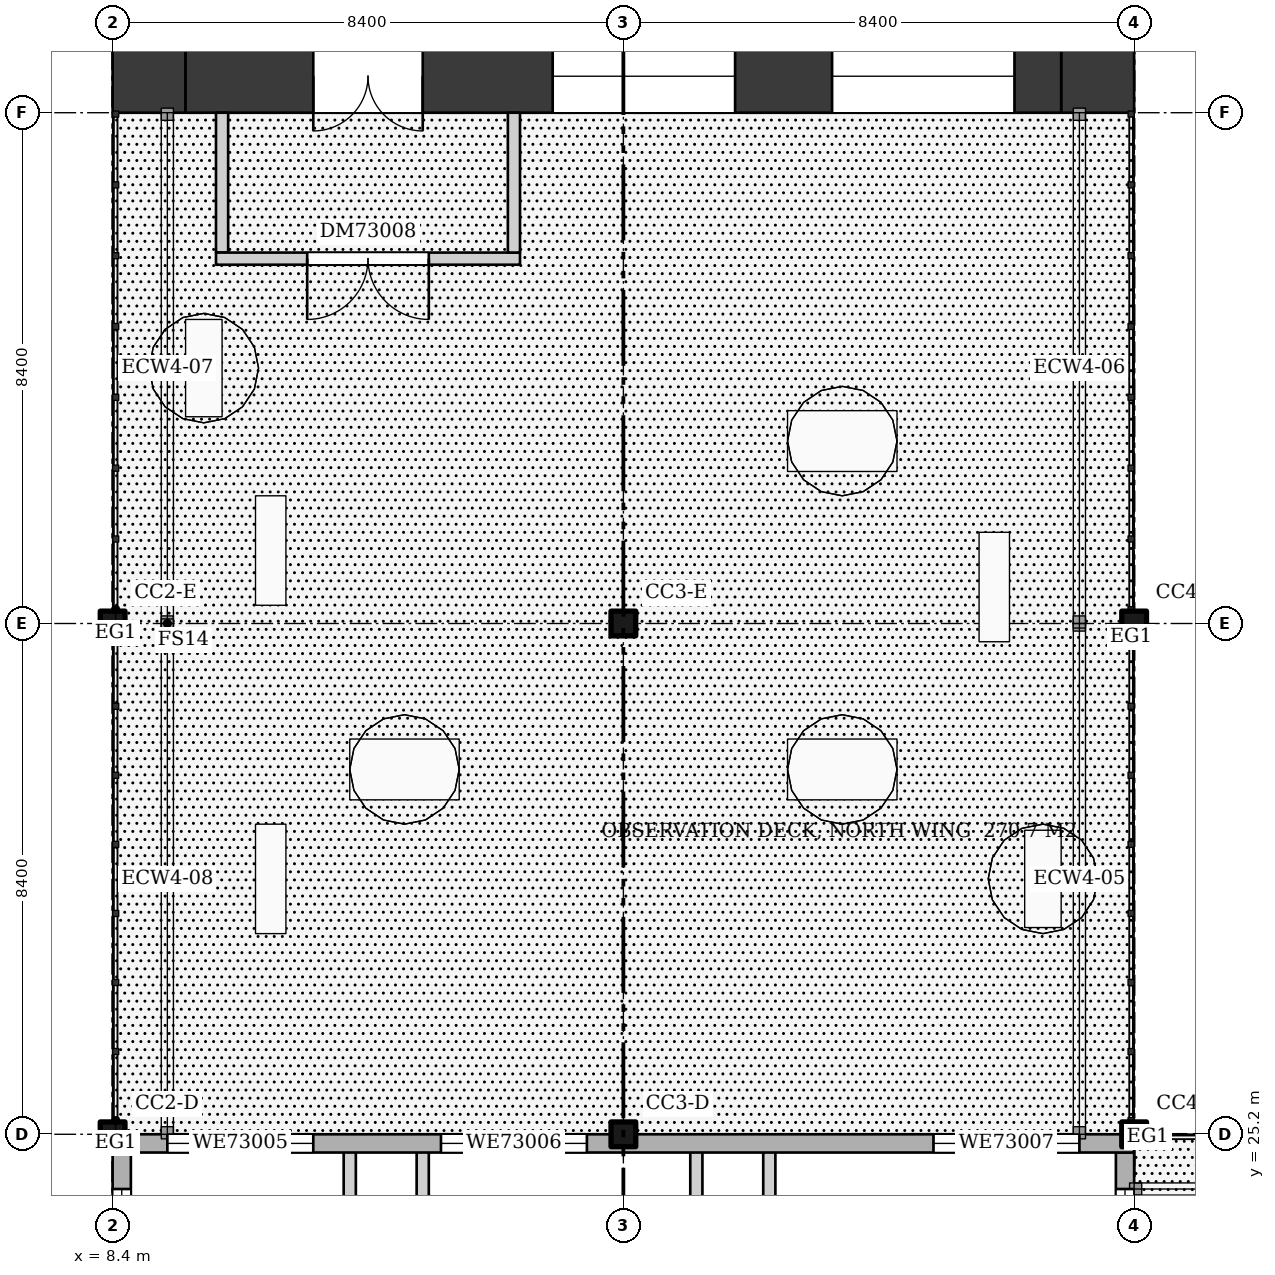
"""IFC4 building model, lengths in metres.
Left out: names, types, materials, properties, quantities, classifications, styles, units other than length and angle.
Written with IfcOpenShell. Run it as: python <this file> out.ifc"""

import sys

from ifc_helpers import new_model, si_unit, direction, frame, frame_2d, origin, origin_2d, place, context, subcontext, project, spatial, rectangle, hollow_circle, extrude, element, fill, save


model = new_model("IFC4")
c1 = context("Model", 3, precision=1e-05, world=origin(), true_north=direction((0.0, 1.0)))
c2 = subcontext(c1, "Body", "Model", "MODEL_VIEW")
j1 = project(units=[si_unit("LENGTHUNIT", "METRE"), si_unit("PLANEANGLEUNIT", "RADIAN")], contexts=[c1])
p1 = place(None, origin())
s1 = spatial("IfcSite", under=j1, at=p1, CompositionType="ELEMENT")
p2 = place(p1, origin())
s2 = spatial("IfcBuilding", under=s1, at=p2, CompositionType="ELEMENT")
p3 = place(p2, frame((0.0, 0.0, 277.2)))
s3 = spatial("IfcBuildingStorey", under=s2, at=p3, CompositionType="ELEMENT", Elevation=277.2)
for number, where, z_axis, x_axis in (
    (1, (8.4, 25.2, 0.0), (0.0, 0.0, 1.0), (1.0, 0.0, 0.0)),
    (2, (8.4, 33.6, 0.0), (0.0, 0.0, 1.0), (1.0, 0.0, 0.0)),
    (3, (16.8, 25.2, 0.0), (0.0, 0.0, 1.0), (1.0, 0.0, 0.0)),
    (4, (16.8, 33.6, 0.0), (0.0, 0.0, 1.0), (1.0, 0.0, 0.0)),
    (5, (25.2, 25.2, 0.0), (0.0, 0.0, 1.0), (1.0, 0.0, 0.0)),
    (6, (25.2, 33.6, 0.0), (0.0, 0.0, 1.0), (1.0, 0.0, 0.0)),
):
    element("IfcColumn", number, at=place(p3, frame(where, z_axis=z_axis, x_axis=x_axis)), inside=s3, PredefinedType="COLUMN", context=c2, shape_type="SweptSolid", body=[
        extrude(hollow_circle(Radius=0.203, WallThickness=0.016, at=origin_2d()), origin(), (0.0, 0.0, 1.0), 6.65),
    ])
p4 = place(p3, frame((9.0, 58.8, 0.0), z_axis=(0.0, 0.0, 1.0), x_axis=(0.0, -1.0, 0.0)))
e7 = element("IfcWall", 7, at=p4, inside=s3, PredefinedType="SHEAR", context=c2, shape_type="SweptSolid", body=[
    extrude(rectangle(XDim=16.8, YDim=1.2, at=frame_2d((8.4, 0.0))), origin(), (0.0, 0.0, 1.0), 6.58),
])
p5 = place(p4, frame((1.6, 0.0, 0.6)))
e8 = element("IfcOpeningElement", 8, at=p5, cuts=e7, PredefinedType="OPENING", context=c2, shape_type="SweptSolid", body=[
    extrude(rectangle(XDim=2.4, YDim=2.1, at=frame_2d((1.2, 1.05))), frame((0.0, 0.61, 0.0), z_axis=(0.0, -1.0, 0.0), x_axis=(1.0, 0.0, 0.0)), (0.0, 0.0, 1.0), 1.22),
])
p6 = place(p4, frame((4.938, 0.0, 1.6)))
e9 = element("IfcOpeningElement", 9, at=p6, cuts=e7, PredefinedType="OPENING", context=c2, shape_type="SweptSolid", body=[
    extrude(rectangle(XDim=3.0, YDim=1.2, at=frame_2d((1.5, 0.6))), frame((0.0, 0.61, 0.0), z_axis=(0.0, -1.0, 0.0), x_axis=(1.0, 0.0, 0.0)), (0.0, 0.0, 1.0), 1.22),
])
p7 = place(p4, frame((8.863, 0.0, 1.6)))
e10 = element("IfcOpeningElement", 10, at=p7, cuts=e7, PredefinedType="OPENING", context=c2, shape_type="SweptSolid", body=[
    extrude(rectangle(XDim=3.0, YDim=1.2, at=frame_2d((1.5, 0.6))), frame((0.0, 0.61, 0.0), z_axis=(0.0, -1.0, 0.0), x_axis=(1.0, 0.0, 0.0)), (0.0, 0.0, 1.0), 1.22),
])
p8 = place(p4, frame((12.8, 0.0, 0.6)))
e11 = element("IfcOpeningElement", 11, at=p8, cuts=e7, PredefinedType="OPENING", context=c2, shape_type="SweptSolid", body=[
    extrude(rectangle(XDim=2.4, YDim=2.1, at=frame_2d((1.2, 1.05))), frame((0.0, 0.61, 0.0), z_axis=(0.0, -1.0, 0.0), x_axis=(1.0, 0.0, 0.0)), (0.0, 0.0, 1.0), 1.22),
])
p9 = place(p3, frame((24.6, 58.8, 0.0), z_axis=(0.0, 0.0, 1.0), x_axis=(0.0, -1.0, 0.0)))
e12 = element("IfcWall", 12, at=p9, inside=s3, PredefinedType="SHEAR", context=c2, shape_type="SweptSolid", body=[
    extrude(rectangle(XDim=16.8, YDim=1.2, at=frame_2d((8.4, 0.0))), origin(), (0.0, 0.0, 1.0), 6.58),
])
p10 = place(p9, frame((1.8, 0.0, 0.5)))
e13 = element("IfcOpeningElement", 13, at=p10, cuts=e12, PredefinedType="OPENING", context=c2, shape_type="SweptSolid", body=[
    extrude(rectangle(XDim=1.8, YDim=2.4, at=frame_2d((0.9, 1.2))), frame((0.0, 0.61, 0.0), z_axis=(0.0, -1.0, 0.0), x_axis=(1.0, 0.0, 0.0)), (0.0, 0.0, 1.0), 1.22),
])
p11 = place(p9, frame((4.644, 0.0, 1.6)))
e14 = element("IfcOpeningElement", 14, at=p11, cuts=e12, PredefinedType="OPENING", context=c2, shape_type="SweptSolid", body=[
    extrude(rectangle(XDim=1.2, YDim=1.2, at=frame_2d((0.6, 0.6))), frame((0.0, 0.61, 0.0), z_axis=(0.0, -1.0, 0.0), x_axis=(1.0, 0.0, 0.0)), (0.0, 0.0, 1.0), 1.22),
])
p12 = place(p9, frame((6.45, 0.0, 1.6)))
e15 = element("IfcOpeningElement", 15, at=p12, cuts=e12, PredefinedType="OPENING", context=c2, shape_type="SweptSolid", body=[
    extrude(rectangle(XDim=1.8, YDim=1.2, at=frame_2d((0.9, 0.6))), frame((0.0, 0.61, 0.0), z_axis=(0.0, -1.0, 0.0), x_axis=(1.0, 0.0, 0.0)), (0.0, 0.0, 1.0), 1.22),
])
p13 = place(p9, frame((12.65, 0.0, 0.6)))
e16 = element("IfcOpeningElement", 16, at=p13, cuts=e12, PredefinedType="OPENING", context=c2, shape_type="SweptSolid", body=[
    extrude(rectangle(XDim=1.0, YDim=2.1, at=frame_2d((0.5, 1.05))), frame((0.0, 0.61, 0.0), z_axis=(0.0, -1.0, 0.0), x_axis=(1.0, 0.0, 0.0)), (0.0, 0.0, 1.0), 1.22),
])
p14 = place(p9, frame((14.175, 0.0, 1.6)))
e17 = element("IfcOpeningElement", 17, at=p14, cuts=e12, PredefinedType="OPENING", context=c2, shape_type="SweptSolid", body=[
    extrude(rectangle(XDim=1.2, YDim=1.2, at=frame_2d((0.6, 0.6))), frame((0.0, 0.61, 0.0), z_axis=(0.0, -1.0, 0.0), x_axis=(1.0, 0.0, 0.0)), (0.0, 0.0, 1.0), 1.22),
])
p15 = place(p3, frame((9.6, 42.6, 0.0), z_axis=(0.0, 0.0, 1.0), x_axis=(1.0, 0.0, 0.0)))
e18 = element("IfcWall", 18, at=p15, inside=s3, PredefinedType="SHEAR", context=c2, shape_type="SweptSolid", body=[
    extrude(rectangle(XDim=14.4, YDim=1.2, at=frame_2d((7.2, 0.0))), origin(), (0.0, 0.0, 1.0), 6.58),
])
p16 = place(p15, frame((2.1, 0.0, 0.0)))
e19 = element("IfcOpeningElement", 19, at=p16, cuts=e18, PredefinedType="OPENING", context=c2, shape_type="SweptSolid", body=[
    extrude(rectangle(XDim=1.8, YDim=2.1, at=frame_2d((0.9, 1.05))), frame((0.0, 0.61, 0.0), z_axis=(0.0, -1.0, 0.0), x_axis=(1.0, 0.0, 0.0)), (0.0, 0.0, 1.0), 1.22),
])
p17 = place(p15, frame((6.038, 0.0, 1.6)))
e20 = element("IfcOpeningElement", 20, at=p17, cuts=e18, PredefinedType="OPENING", context=c2, shape_type="SweptSolid", body=[
    extrude(rectangle(XDim=3.0, YDim=1.2, at=frame_2d((1.5, 0.6))), frame((0.0, 0.61, 0.0), z_axis=(0.0, -1.0, 0.0), x_axis=(1.0, 0.0, 0.0)), (0.0, 0.0, 1.0), 1.22),
])
p18 = place(p15, frame((10.633, 0.0, 1.6)))
e21 = element("IfcOpeningElement", 21, at=p18, cuts=e18, PredefinedType="OPENING", context=c2, shape_type="SweptSolid", body=[
    extrude(rectangle(XDim=3.0, YDim=1.2, at=frame_2d((1.5, 0.6))), frame((0.0, 0.61, 0.0), z_axis=(0.0, -1.0, 0.0), x_axis=(1.0, 0.0, 0.0)), (0.0, 0.0, 1.0), 1.22),
])
p19 = place(p3, frame((10.2, 39.7, 0.0), z_axis=(0.0, 0.0, 1.0), x_axis=(0.0, 1.0, 0.0)))
e22 = element("IfcWall", 22, at=p19, inside=s3, PredefinedType="PARTITIONING", context=c2, shape_type="SweptSolid", body=[
    extrude(rectangle(XDim=2.3, YDim=0.2, at=frame_2d((1.15, 0.0))), origin(), (0.0, 0.0, 1.0), 6.65),
])
p20 = place(p3, frame((10.1, 39.6, 0.0), z_axis=(0.0, 0.0, 1.0), x_axis=(1.0, 0.0, 0.0)))
e23 = element("IfcWall", 23, at=p20, inside=s3, PredefinedType="PARTITIONING", context=c2, shape_type="SweptSolid", body=[
    extrude(rectangle(XDim=5.0, YDim=0.2, at=frame_2d((2.5, 0.0))), origin(), (0.0, 0.0, 1.0), 6.65),
])
p21 = place(p20, frame((1.5, 0.0, 0.0)))
e24 = element("IfcOpeningElement", 24, at=p21, cuts=e23, PredefinedType="OPENING", context=c2, shape_type="SweptSolid", body=[
    extrude(rectangle(XDim=2.0, YDim=2.1, at=frame_2d((1.0, 1.05))), frame((0.0, 0.11, 0.0), z_axis=(0.0, -1.0, 0.0), x_axis=(1.0, 0.0, 0.0)), (0.0, 0.0, 1.0), 0.22),
])
p22 = place(p3, frame((12.3, 21.1, 0.0), z_axis=(0.0, 0.0, 1.0), x_axis=(0.0, 1.0, 0.0)))
e25 = element("IfcWall", 25, at=p22, inside=s3, PredefinedType="PARTITIONING", context=c2, shape_type="SweptSolid", body=[
    extrude(rectangle(XDim=3.95, YDim=0.2, at=frame_2d((1.975, 0.0))), origin(), (0.0, 0.0, 1.0), 6.65),
])
p23 = place(p22, frame((1.475, 0.0, 0.0)))
e26 = element("IfcOpeningElement", 26, at=p23, cuts=e25, PredefinedType="OPENING", context=c2, shape_type="SweptSolid", body=[
    extrude(rectangle(XDim=1.0, YDim=2.1, at=frame_2d((0.5, 1.05))), frame((0.0, 0.11, 0.0), z_axis=(0.0, -1.0, 0.0), x_axis=(1.0, 0.0, 0.0)), (0.0, 0.0, 1.0), 0.22),
])
p24 = place(p3, frame((13.5, 20.8, 0.0), z_axis=(0.0, 0.0, 1.0), x_axis=(0.0, 1.0, 0.0)))
e27 = element("IfcWall", 27, at=p24, inside=s3, PredefinedType="PARTITIONING", context=c2, shape_type="SweptSolid", body=[
    extrude(rectangle(XDim=4.25, YDim=0.2, at=frame_2d((2.125, 0.0))), origin(), (0.0, 0.0, 1.0), 6.65),
])
p25 = place(p3, frame((15.0, 39.7, 0.0), z_axis=(0.0, 0.0, 1.0), x_axis=(0.0, 1.0, 0.0)))
e28 = element("IfcWall", 28, at=p25, inside=s3, PredefinedType="PARTITIONING", context=c2, shape_type="SweptSolid", body=[
    extrude(rectangle(XDim=2.3, YDim=0.2, at=frame_2d((1.15, 0.0))), origin(), (0.0, 0.0, 1.0), 6.65),
])
p26 = place(p3, frame((18.0, 17.0, 0.0), z_axis=(0.0, 0.0, 1.0), x_axis=(0.0, 1.0, 0.0)))
e29 = element("IfcWall", 29, at=p26, inside=s3, PredefinedType="PARTITIONING", context=c2, shape_type="SweptSolid", body=[
    extrude(rectangle(XDim=8.05, YDim=0.2, at=frame_2d((4.025, 0.0))), origin(), (0.0, 0.0, 1.0), 6.65),
])
p27 = place(p26, frame((3.525, 0.0, 0.0)))
e30 = element("IfcOpeningElement", 30, at=p27, cuts=e29, PredefinedType="OPENING", context=c2, shape_type="SweptSolid", body=[
    extrude(rectangle(XDim=1.0, YDim=2.1, at=frame_2d((0.5, 1.05))), frame((0.0, 0.11, 0.0), z_axis=(0.0, -1.0, 0.0), x_axis=(1.0, 0.0, 0.0)), (0.0, 0.0, 1.0), 0.22),
])
p28 = place(p3, frame((19.2, 21.1, 0.0), z_axis=(0.0, 0.0, 1.0), x_axis=(0.0, 1.0, 0.0)))
e31 = element("IfcWall", 31, at=p28, inside=s3, PredefinedType="PARTITIONING", context=c2, shape_type="SweptSolid", body=[
    extrude(rectangle(XDim=3.95, YDim=0.2, at=frame_2d((1.975, 0.0))), origin(), (0.0, 0.0, 1.0), 6.65),
])
p29 = place(p28, frame((1.475, 0.0, 0.0)))
e32 = element("IfcOpeningElement", 32, at=p29, cuts=e31, PredefinedType="OPENING", context=c2, shape_type="SweptSolid", body=[
    extrude(rectangle(XDim=1.0, YDim=2.1, at=frame_2d((0.5, 1.05))), frame((0.0, 0.11, 0.0), z_axis=(0.0, -1.0, 0.0), x_axis=(1.0, 0.0, 0.0)), (0.0, 0.0, 1.0), 0.22),
])
p30 = place(p3, frame((25.05, 8.7, 0.0), z_axis=(0.0, 0.0, 1.0), x_axis=(0.0, 1.0, 0.0)))
e33 = element("IfcWall", 33, at=p30, inside=s3, PredefinedType="SOLIDWALL", context=c2, shape_type="SweptSolid", body=[
    extrude(rectangle(XDim=16.2, YDim=0.3, at=frame_2d((8.1, 0.0))), origin(), (0.0, 0.0, 1.0), 6.3),
])
p31 = place(p30, frame((0.6, 0.0, 0.6)))
e34 = element("IfcOpeningElement", 34, at=p31, cuts=e33, PredefinedType="OPENING", context=c2, shape_type="SweptSolid", body=[
    extrude(rectangle(XDim=2.4, YDim=2.4, at=frame_2d((1.2, 1.2))), frame((0.0, 0.16, 0.0), z_axis=(0.0, -1.0, 0.0), x_axis=(1.0, 0.0, 0.0)), (0.0, 0.0, 1.0), 0.32),
])
p32 = place(p30, frame((4.8, 0.0, 0.6)))
e35 = element("IfcOpeningElement", 35, at=p32, cuts=e33, PredefinedType="OPENING", context=c2, shape_type="SweptSolid", body=[
    extrude(rectangle(XDim=2.4, YDim=2.4, at=frame_2d((1.2, 1.2))), frame((0.0, 0.16, 0.0), z_axis=(0.0, -1.0, 0.0), x_axis=(1.0, 0.0, 0.0)), (0.0, 0.0, 1.0), 0.32),
])
p33 = place(p30, frame((9.0, 0.0, 0.6)))
e36 = element("IfcOpeningElement", 36, at=p33, cuts=e33, PredefinedType="OPENING", context=c2, shape_type="SweptSolid", body=[
    extrude(rectangle(XDim=2.4, YDim=2.4, at=frame_2d((1.2, 1.2))), frame((0.0, 0.16, 0.0), z_axis=(0.0, -1.0, 0.0), x_axis=(1.0, 0.0, 0.0)), (0.0, 0.0, 1.0), 0.32),
])
p34 = place(p30, frame((13.2, 0.0, 0.6)))
e37 = element("IfcOpeningElement", 37, at=p34, cuts=e33, PredefinedType="OPENING", context=c2, shape_type="SweptSolid", body=[
    extrude(rectangle(XDim=2.4, YDim=2.4, at=frame_2d((1.2, 1.2))), frame((0.0, 0.16, 0.0), z_axis=(0.0, -1.0, 0.0), x_axis=(1.0, 0.0, 0.0)), (0.0, 0.0, 1.0), 0.32),
])
p35 = place(p3, frame((25.2, 25.05, 0.0), z_axis=(0.0, 0.0, 1.0), x_axis=(-1.0, 0.0, 0.0)))
e38 = element("IfcWall", 38, at=p35, inside=s3, PredefinedType="SOLIDWALL", context=c2, shape_type="SweptSolid", body=[
    extrude(rectangle(XDim=16.8, YDim=0.3, at=frame_2d((8.4, 0.0))), origin(), (0.0, 0.0, 1.0), 6.3),
])
p36 = place(p35, frame((13.5, 0.0, 0.6)))
e39 = element("IfcOpeningElement", 39, at=p36, cuts=e38, PredefinedType="OPENING", context=c2, shape_type="SweptSolid", body=[
    extrude(rectangle(XDim=2.4, YDim=2.4, at=frame_2d((1.2, 1.2))), frame((0.0, 0.16, 0.0), z_axis=(0.0, -1.0, 0.0), x_axis=(1.0, 0.0, 0.0)), (0.0, 0.0, 1.0), 0.32),
])
p37 = place(p35, frame((9.0, 0.0, 0.6)))
e40 = element("IfcOpeningElement", 40, at=p37, cuts=e38, PredefinedType="OPENING", context=c2, shape_type="SweptSolid", body=[
    extrude(rectangle(XDim=2.4, YDim=2.4, at=frame_2d((1.2, 1.2))), frame((0.0, 0.16, 0.0), z_axis=(0.0, -1.0, 0.0), x_axis=(1.0, 0.0, 0.0)), (0.0, 0.0, 1.0), 0.32),
])
p38 = place(p35, frame((0.9, 0.0, 0.6)))
e41 = element("IfcOpeningElement", 41, at=p38, cuts=e38, PredefinedType="OPENING", context=c2, shape_type="SweptSolid", body=[
    extrude(rectangle(XDim=2.4, YDim=2.4, at=frame_2d((1.2, 1.2))), frame((0.0, 0.16, 0.0), z_axis=(0.0, -1.0, 0.0), x_axis=(1.0, 0.0, 0.0)), (0.0, 0.0, 1.0), 0.32),
])
p39 = place(p3, frame((8.55, 24.9, 0.0), z_axis=(0.0, 0.0, 1.0), x_axis=(0.0, -1.0, 0.0)))
e42 = element("IfcWall", 42, at=p39, inside=s3, PredefinedType="SOLIDWALL", context=c2, shape_type="SweptSolid", body=[
    extrude(rectangle(XDim=16.2, YDim=0.3, at=frame_2d((8.1, 0.0))), origin(), (0.0, 0.0, 1.0), 6.062),
])
p40 = place(p39, frame((13.2, 0.0, 0.6)))
e43 = element("IfcOpeningElement", 43, at=p40, cuts=e42, PredefinedType="OPENING", context=c2, shape_type="SweptSolid", body=[
    extrude(rectangle(XDim=2.4, YDim=2.4, at=frame_2d((1.2, 1.2))), frame((0.0, 0.16, 0.0), z_axis=(0.0, -1.0, 0.0), x_axis=(1.0, 0.0, 0.0)), (0.0, 0.0, 1.0), 0.32),
])
p41 = place(p39, frame((9.0, 0.0, 0.6)))
e44 = element("IfcOpeningElement", 44, at=p41, cuts=e42, PredefinedType="OPENING", context=c2, shape_type="SweptSolid", body=[
    extrude(rectangle(XDim=2.4, YDim=2.4, at=frame_2d((1.2, 1.2))), frame((0.0, 0.16, 0.0), z_axis=(0.0, -1.0, 0.0), x_axis=(1.0, 0.0, 0.0)), (0.0, 0.0, 1.0), 0.32),
])
p42 = place(p39, frame((4.8, 0.0, 0.6)))
e45 = element("IfcOpeningElement", 45, at=p42, cuts=e42, PredefinedType="OPENING", context=c2, shape_type="SweptSolid", body=[
    extrude(rectangle(XDim=2.4, YDim=2.4, at=frame_2d((1.2, 1.2))), frame((0.0, 0.16, 0.0), z_axis=(0.0, -1.0, 0.0), x_axis=(1.0, 0.0, 0.0)), (0.0, 0.0, 1.0), 0.32),
])
p43 = place(p39, frame((0.6, 0.0, 0.6)))
e46 = element("IfcOpeningElement", 46, at=p43, cuts=e42, PredefinedType="OPENING", context=c2, shape_type="SweptSolid", body=[
    extrude(rectangle(XDim=2.4, YDim=2.4, at=frame_2d((1.2, 1.2))), frame((0.0, 0.16, 0.0), z_axis=(0.0, -1.0, 0.0), x_axis=(1.0, 0.0, 0.0)), (0.0, 0.0, 1.0), 0.32),
])
p44 = place(p16, frame((1.8, 0.0, 0.0), z_axis=(0.0, 0.0, 1.0), x_axis=(-1.0, 0.0, 0.0)))
e47 = element("IfcDoor", 47, at=p44, inside=s3, OperationType="DOUBLE_DOOR_SINGLE_SWING", PredefinedType="DOOR", context=c2, shape_type="SweptSolid", body=[
    extrude(rectangle(XDim=1.8, YDim=2.1, at=frame_2d((0.9, 1.05))), frame((0.0, 0.025, 0.0), z_axis=(0.0, -1.0, 0.0), x_axis=(1.0, 0.0, 0.0)), (0.0, 0.0, 1.0), 0.05),
])
fill(e19, e47)
p45 = place(p17, origin())
e48 = element("IfcWindow", 48, at=p45, inside=s3, PartitioningType="SINGLE_PANEL", PredefinedType="WINDOW", context=c2, shape_type="SweptSolid", body=[
    extrude(rectangle(XDim=3.0, YDim=1.2, at=frame_2d((1.5, 0.6))), frame((0.0, 0.03, 0.0), z_axis=(0.0, -1.0, 0.0), x_axis=(1.0, 0.0, 0.0)), (0.0, 0.0, 1.0), 0.06),
])
fill(e20, e48)
p46 = place(p18, origin())
e49 = element("IfcWindow", 49, at=p46, inside=s3, PartitioningType="SINGLE_PANEL", PredefinedType="WINDOW", context=c2, shape_type="SweptSolid", body=[
    extrude(rectangle(XDim=3.0, YDim=1.2, at=frame_2d((1.5, 0.6))), frame((0.0, 0.03, 0.0), z_axis=(0.0, -1.0, 0.0), x_axis=(1.0, 0.0, 0.0)), (0.0, 0.0, 1.0), 0.06),
])
fill(e21, e49)
p47 = place(p21, frame((2.0, 0.0, 0.0), z_axis=(0.0, 0.0, 1.0), x_axis=(-1.0, 0.0, 0.0)))
e50 = element("IfcDoor", 50, at=p47, inside=s3, OperationType="DOUBLE_DOOR_SINGLE_SWING", PredefinedType="DOOR", context=c2, shape_type="SweptSolid", body=[
    extrude(rectangle(XDim=2.0, YDim=2.1, at=frame_2d((1.0, 1.05))), frame((0.0, 0.025, 0.0), z_axis=(0.0, -1.0, 0.0), x_axis=(1.0, 0.0, 0.0)), (0.0, 0.0, 1.0), 0.05),
])
fill(e24, e50)
p48 = place(p34, origin())
e51 = element("IfcWindow", 51, at=p48, inside=s3, PartitioningType="SINGLE_PANEL", PredefinedType="WINDOW", context=c2, shape_type="SweptSolid", body=[
    extrude(rectangle(XDim=2.4, YDim=2.4, at=frame_2d((1.2, 1.2))), frame((0.0, 0.03, 0.0), z_axis=(0.0, -1.0, 0.0), x_axis=(1.0, 0.0, 0.0)), (0.0, 0.0, 1.0), 0.06),
])
fill(e37, e51)
p49 = place(p36, origin())
e52 = element("IfcWindow", 52, at=p49, inside=s3, PartitioningType="SINGLE_PANEL", PredefinedType="WINDOW", context=c2, shape_type="SweptSolid", body=[
    extrude(rectangle(XDim=2.4, YDim=2.4, at=frame_2d((1.2, 1.2))), frame((0.0, 0.03, 0.0), z_axis=(0.0, -1.0, 0.0), x_axis=(1.0, 0.0, 0.0)), (0.0, 0.0, 1.0), 0.06),
])
fill(e39, e52)
p50 = place(p37, origin())
e53 = element("IfcWindow", 53, at=p50, inside=s3, PartitioningType="SINGLE_PANEL", PredefinedType="WINDOW", context=c2, shape_type="SweptSolid", body=[
    extrude(rectangle(XDim=2.4, YDim=2.4, at=frame_2d((1.2, 1.2))), frame((0.0, 0.03, 0.0), z_axis=(0.0, -1.0, 0.0), x_axis=(1.0, 0.0, 0.0)), (0.0, 0.0, 1.0), 0.06),
])
fill(e40, e53)
p51 = place(p38, origin())
e54 = element("IfcWindow", 54, at=p51, inside=s3, PartitioningType="SINGLE_PANEL", PredefinedType="WINDOW", context=c2, shape_type="SweptSolid", body=[
    extrude(rectangle(XDim=2.4, YDim=2.4, at=frame_2d((1.2, 1.2))), frame((0.0, 0.03, 0.0), z_axis=(0.0, -1.0, 0.0), x_axis=(1.0, 0.0, 0.0)), (0.0, 0.0, 1.0), 0.06),
])
fill(e41, e54)
p52 = place(p43, origin())
e55 = element("IfcWindow", 55, at=p52, inside=s3, PartitioningType="SINGLE_PANEL", PredefinedType="WINDOW", context=c2, shape_type="SweptSolid", body=[
    extrude(rectangle(XDim=2.4, YDim=2.4, at=frame_2d((1.2, 1.2))), frame((0.0, 0.03, 0.0), z_axis=(0.0, -1.0, 0.0), x_axis=(1.0, 0.0, 0.0)), (0.0, 0.0, 1.0), 0.06),
])
fill(e46, e55)
save(model, sys.argv[1])
